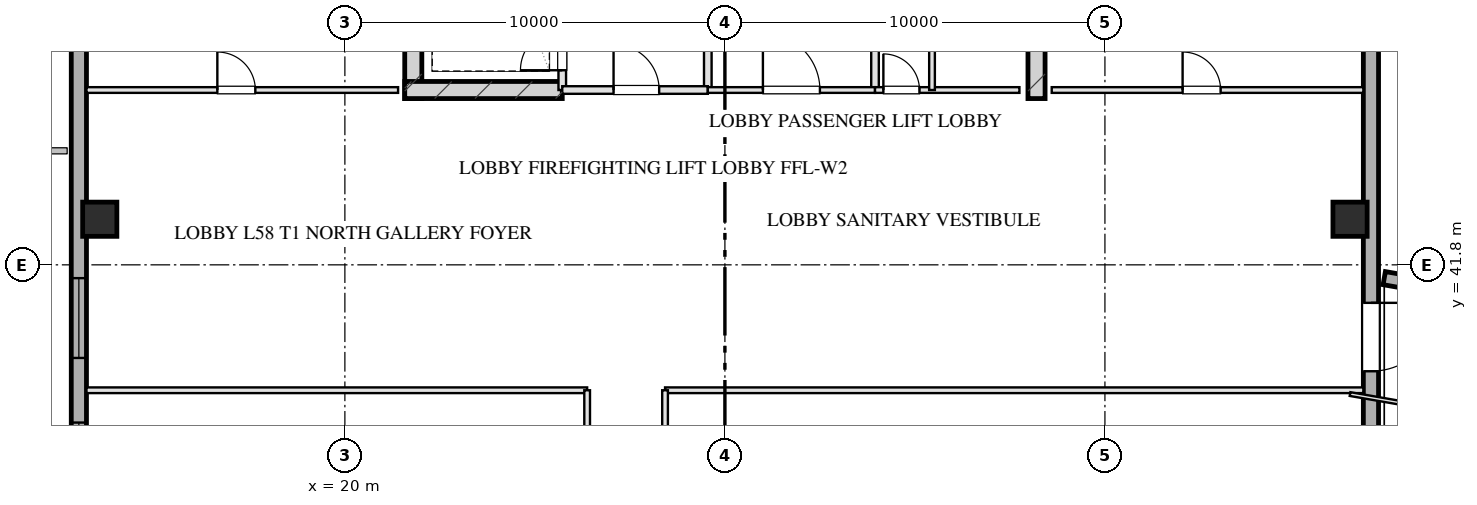
"""IFC4 building model, lengths in metres.
Left out: names, types, materials, properties, quantities, classifications, styles, units other than length and angle.
Written with IfcOpenShell. Run it as: python <this file> out.ifc"""

import sys

from ifc_helpers import new_model, si_unit, direction, frame, frame_2d, origin, origin_2d, place, context, subcontext, project, spatial, rectangle, hollow_rectangle, extrude, element, fill, save


model = new_model("IFC4")
c1 = context("Model", 3, precision=1e-05, world=origin(), true_north=direction((0.0, 1.0)))
c2 = subcontext(c1, "Body", "Model", "MODEL_VIEW")
j1 = project(units=[si_unit("LENGTHUNIT", "METRE"), si_unit("PLANEANGLEUNIT", "RADIAN")], contexts=[c1])
p1 = place(None, origin())
s1 = spatial("IfcSite", under=j1, at=p1, CompositionType="ELEMENT")
p2 = place(p1, origin())
s2 = spatial("IfcBuilding", under=s1, at=p2, CompositionType="ELEMENT")
p3 = place(p2, frame((0.0, 0.0, 216.2)))
s3 = spatial("IfcBuildingStorey", under=s2, at=p3, CompositionType="ELEMENT", Elevation=216.2)
for number, where, z_axis, x_axis in (
    (1, (21.8, 46.175, 0.0), (0.0, 0.0, 1.0), (0.0, 1.0, 0.0)),
    (2, (38.2, 46.175, 0.0), (0.0, 0.0, 1.0), (0.0, 1.0, 0.0)),
):
    element("IfcWall", number, at=place(p3, frame(where, z_axis=z_axis, x_axis=x_axis)), inside=s3, PredefinedType="SHEAR", context=c2, shape_type="SweptSolid", body=[
        extrude(rectangle(XDim=9.33, YDim=0.45, at=frame_2d((4.665, 0.0))), origin(), (0.0, 0.0, 1.0), 3.45),
    ])
p4 = place(p3, frame((21.575, 46.4, 0.0), z_axis=(0.0, 0.0, 1.0), x_axis=(1.0, 0.0, 0.0)))
e3 = element("IfcWall", 3, at=p4, inside=s3, PredefinedType="SHEAR", context=c2, shape_type="SweptSolid", body=[
    extrude(rectangle(XDim=4.145, YDim=0.45, at=frame_2d((2.073, 0.0))), origin(), (0.0, 0.0, 1.0), 3.45),
])
for number, where, z_axis, x_axis in (
    (4, (13.55, 43.0, 0.0), (0.0, 0.0, 1.0), (1.0, 0.0, 0.0)),
    (5, (46.45, 43.0, 0.0), (0.0, 0.0, 1.0), (1.0, 0.0, 0.0)),
):
    element("IfcColumn", number, at=place(p3, frame(where, z_axis=z_axis, x_axis=x_axis)), inside=s3, PredefinedType="COLUMN", context=c2, shape_type="SweptSolid", body=[
        extrude(hollow_rectangle(XDim=0.9, YDim=0.9, WallThickness=0.032, at=origin_2d()), origin(), (0.0, 0.0, 1.0), 3.451),
    ])
p5 = place(p3, frame((13.0, 10.8, 0.0), z_axis=(0.0, 0.0, 1.0), x_axis=(0.0, 1.0, 0.0)))
e6 = element("IfcWall", 6, at=p5, inside=s3, PredefinedType="SOLIDWALL", context=c2, shape_type="SweptSolid", body=[
    extrude(rectangle(XDim=46.4, YDim=0.4, at=frame_2d((23.2, 0.0))), origin(), (0.0, 0.0, 1.0), 2.55),
])
p6 = place(p5, frame((15.75, 0.0, 0.75)))
e7 = element("IfcOpeningElement", 7, at=p6, cuts=e6, PredefinedType="OPENING", context=c2, shape_type="SweptSolid", body=[
    extrude(rectangle(XDim=2.1, YDim=1.4, at=frame_2d((1.05, 0.7))), frame((0.0, 0.21, 0.0), z_axis=(0.0, -1.0, 0.0), x_axis=(1.0, 0.0, 0.0)), (0.0, 0.0, 1.0), 0.42),
])
p7 = place(p5, frame((19.55, 0.0, 0.75)))
e8 = element("IfcOpeningElement", 8, at=p7, cuts=e6, PredefinedType="OPENING", context=c2, shape_type="SweptSolid", body=[
    extrude(rectangle(XDim=2.1, YDim=1.4, at=frame_2d((1.05, 0.7))), frame((0.0, 0.21, 0.0), z_axis=(0.0, -1.0, 0.0), x_axis=(1.0, 0.0, 0.0)), (0.0, 0.0, 1.0), 0.42),
])
p8 = place(p5, frame((24.75, 0.0, 0.75)))
e9 = element("IfcOpeningElement", 9, at=p8, cuts=e6, PredefinedType="OPENING", context=c2, shape_type="SweptSolid", body=[
    extrude(rectangle(XDim=2.1, YDim=1.4, at=frame_2d((1.05, 0.7))), frame((0.0, 0.21, 0.0), z_axis=(0.0, -1.0, 0.0), x_axis=(1.0, 0.0, 0.0)), (0.0, 0.0, 1.0), 0.42),
])
p9 = place(p5, frame((28.55, 0.0, 0.75)))
e10 = element("IfcOpeningElement", 10, at=p9, cuts=e6, PredefinedType="OPENING", context=c2, shape_type="SweptSolid", body=[
    extrude(rectangle(XDim=2.1, YDim=1.4, at=frame_2d((1.05, 0.7))), frame((0.0, 0.21, 0.0), z_axis=(0.0, -1.0, 0.0), x_axis=(1.0, 0.0, 0.0)), (0.0, 0.0, 1.0), 0.42),
])
p10 = place(p3, frame((47.0, 57.2, 0.0), z_axis=(0.0, 0.0, 1.0), x_axis=(0.0, -1.0, 0.0)))
e11 = element("IfcWall", 11, at=p10, inside=s3, PredefinedType="SOLIDWALL", context=c2, shape_type="SweptSolid", body=[
    extrude(rectangle(XDim=46.4, YDim=0.4, at=frame_2d((23.2, 0.0))), origin(), (0.0, 0.0, 1.0), 2.55),
])
p11 = place(p10, frame((16.4, 0.0, 0.0)))
e12 = element("IfcOpeningElement", 12, at=p11, cuts=e11, PredefinedType="OPENING", context=c2, shape_type="SweptSolid", body=[
    extrude(rectangle(XDim=1.8, YDim=2.2, at=frame_2d((0.9, 1.1))), frame((0.0, 0.21, 0.0), z_axis=(0.0, -1.0, 0.0), x_axis=(1.0, 0.0, 0.0)), (0.0, 0.0, 1.0), 0.42),
])
p12 = place(p3, frame((74.177, 36.745, 0.0), z_axis=(0.0, 0.0, 1.0), x_axis=(-0.984966283934, 0.172746691759, 0.0)))
e13 = element("IfcWall", 13, at=p12, inside=s3, PredefinedType="SOLIDWALL", context=c2, shape_type="SweptSolid", body=[
    extrude(rectangle(XDim=27.237, YDim=0.35, at=frame_2d((13.618, 0.0))), origin(), (0.0, 0.0, 1.0), 3.15),
])
p13 = place(p3, frame((25.72, 46.4, 0.0), z_axis=(0.0, 0.0, 1.0), x_axis=(0.0, 1.0, 0.0)))
e14 = element("IfcWall", 14, at=p13, inside=s3, PredefinedType="PARTITIONING", context=c2, shape_type="SweptSolid", body=[
    extrude(rectangle(XDim=1.9, YDim=0.2, at=frame_2d((0.95, 0.0))), origin(), (0.0, 0.0, 1.0), 3.155),
])
p14 = place(p13, frame((0.52, 0.0, 0.0)))
e15 = element("IfcOpeningElement", 15, at=p14, cuts=e14, PredefinedType="OPENING", context=c2, shape_type="SweptSolid", body=[
    extrude(rectangle(XDim=1.1, YDim=2.05, at=frame_2d((0.55, 1.025))), frame((0.0, 0.11, 0.0), z_axis=(0.0, -1.0, 0.0), x_axis=(1.0, 0.0, 0.0)), (0.0, 0.0, 1.0), 0.22),
])
p15 = place(p3, frame((29.55, 46.4, 0.0), z_axis=(0.0, 0.0, 1.0), x_axis=(0.0, 1.0, 0.0)))
e16 = element("IfcWall", 16, at=p15, inside=s3, PredefinedType="PARTITIONING", context=c2, shape_type="SweptSolid", body=[
    extrude(rectangle(XDim=8.43, YDim=0.2, at=frame_2d((4.215, 0.0))), origin(), (0.0, 0.0, 1.0), 3.155),
])
p16 = place(p15, frame((5.95, 0.0, 0.0)))
e17 = element("IfcOpeningElement", 17, at=p16, cuts=e16, PredefinedType="OPENING", context=c2, shape_type="SweptSolid", body=[
    extrude(rectangle(XDim=0.9, YDim=2.05, at=frame_2d((0.45, 1.025))), frame((0.0, 0.11, 0.0), z_axis=(0.0, -1.0, 0.0), x_axis=(1.0, 0.0, 0.0)), (0.0, 0.0, 1.0), 0.22),
])
p17 = place(p3, frame((25.72, 46.4, 0.0), z_axis=(0.0, 0.0, 1.0), x_axis=(1.0, 0.0, 0.0)))
e18 = element("IfcWall", 18, at=p17, inside=s3, PredefinedType="PARTITIONING", context=c2, shape_type="SweptSolid", body=[
    extrude(rectangle(XDim=3.83, YDim=0.2, at=frame_2d((1.915, 0.0))), origin(), (0.0, 0.0, 1.0), 3.155),
])
p18 = place(p17, frame((1.35, 0.0, 0.0)))
e19 = element("IfcOpeningElement", 19, at=p18, cuts=e18, PredefinedType="OPENING", context=c2, shape_type="SweptSolid", body=[
    extrude(rectangle(XDim=1.2, YDim=2.05, at=frame_2d((0.6, 1.025))), frame((0.0, 0.11, 0.0), z_axis=(0.0, -1.0, 0.0), x_axis=(1.0, 0.0, 0.0)), (0.0, 0.0, 1.0), 0.22),
])
p19 = place(p3, frame((33.95, 46.4, 0.0), z_axis=(0.0, 0.0, 1.0), x_axis=(0.0, 1.0, 0.0)))
e20 = element("IfcWall", 20, at=p19, inside=s3, PredefinedType="PARTITIONING", context=c2, shape_type="SweptSolid", body=[
    extrude(rectangle(XDim=8.43, YDim=0.2, at=frame_2d((4.215, 0.0))), origin(), (0.0, 0.0, 1.0), 3.155),
])
p20 = place(p3, frame((29.55, 46.4, 0.0), z_axis=(0.0, 0.0, 1.0), x_axis=(1.0, 0.0, 0.0)))
e21 = element("IfcWall", 21, at=p20, inside=s3, PredefinedType="PARTITIONING", context=c2, shape_type="SweptSolid", body=[
    extrude(rectangle(XDim=4.4, YDim=0.15, at=frame_2d((2.2, 0.0))), origin(), (0.0, 0.0, 1.0), 3.155),
])
p21 = place(p20, frame((1.45, 0.0, 0.0)))
e22 = element("IfcOpeningElement", 22, at=p21, cuts=e21, PredefinedType="OPENING", context=c2, shape_type="SweptSolid", body=[
    extrude(rectangle(XDim=1.5, YDim=2.05, at=frame_2d((0.75, 1.025))), frame((0.0, 0.085, 0.0), z_axis=(0.0, -1.0, 0.0), x_axis=(1.0, 0.0, 0.0)), (0.0, 0.0, 1.0), 0.17),
])
p22 = place(p3, frame((33.95, 46.4, 0.0), z_axis=(0.0, 0.0, 1.0), x_axis=(1.0, 0.0, 0.0)))
e23 = element("IfcWall", 23, at=p22, inside=s3, PredefinedType="PARTITIONING", context=c2, shape_type="SweptSolid", body=[
    extrude(rectangle(XDim=3.8, YDim=0.15, at=frame_2d((1.9, 0.0))), origin(), (0.0, 0.0, 1.0), 3.155),
])
p23 = place(p22, frame((0.22, 0.0, 0.0)))
e24 = element("IfcOpeningElement", 24, at=p23, cuts=e23, PredefinedType="OPENING", context=c2, shape_type="SweptSolid", body=[
    extrude(rectangle(XDim=0.95, YDim=2.05, at=frame_2d((0.475, 1.025))), frame((0.0, 0.085, 0.0), z_axis=(0.0, -1.0, 0.0), x_axis=(1.0, 0.0, 0.0)), (0.0, 0.0, 1.0), 0.17),
])
p24 = place(p3, frame((35.45, 46.4, 0.0), z_axis=(0.0, 0.0, 1.0), x_axis=(0.0, 1.0, 0.0)))
e25 = element("IfcWall", 25, at=p24, inside=s3, PredefinedType="PARTITIONING", context=c2, shape_type="SweptSolid", body=[
    extrude(rectangle(XDim=8.43, YDim=0.15, at=frame_2d((4.215, 0.0))), origin(), (0.0, 0.0, 1.0), 2.745),
])
p25 = place(p24, frame((2.55, 0.0, 0.0)))
e26 = element("IfcOpeningElement", 26, at=p25, cuts=e25, PredefinedType="OPENING", context=c2, shape_type="SweptSolid", body=[
    extrude(rectangle(XDim=0.95, YDim=2.05, at=frame_2d((0.475, 1.025))), frame((0.0, 0.085, 0.0), z_axis=(0.0, -1.0, 0.0), x_axis=(1.0, 0.0, 0.0)), (0.0, 0.0, 1.0), 0.17),
])
p26 = place(p24, frame((4.7, 0.0, 0.0)))
e27 = element("IfcOpeningElement", 27, at=p26, cuts=e25, PredefinedType="OPENING", context=c2, shape_type="SweptSolid", body=[
    extrude(rectangle(XDim=0.9, YDim=2.05, at=frame_2d((0.45, 1.025))), frame((0.0, 0.085, 0.0), z_axis=(0.0, -1.0, 0.0), x_axis=(1.0, 0.0, 0.0)), (0.0, 0.0, 1.0), 0.17),
])
p27 = place(p24, frame((6.8, 0.0, 0.0)))
e28 = element("IfcOpeningElement", 28, at=p27, cuts=e25, PredefinedType="OPENING", context=c2, shape_type="SweptSolid", body=[
    extrude(rectangle(XDim=0.9, YDim=2.05, at=frame_2d((0.45, 1.025))), frame((0.0, 0.085, 0.0), z_axis=(0.0, -1.0, 0.0), x_axis=(1.0, 0.0, 0.0)), (0.0, 0.0, 1.0), 0.17),
])
p28 = place(p3, frame((13.2, 46.4, 0.0), z_axis=(0.0, 0.0, 1.0), x_axis=(1.0, 0.0, 0.0)))
e29 = element("IfcWall", 29, at=p28, inside=s3, PredefinedType="PARTITIONING", context=c2, shape_type="SweptSolid", body=[
    extrude(rectangle(XDim=8.2, YDim=0.15, at=frame_2d((4.1, 0.0))), origin(), (0.0, 0.0, 1.0), 3.155),
])
p29 = place(p28, frame((3.444, 0.0, 0.0)))
e30 = element("IfcOpeningElement", 30, at=p29, cuts=e29, PredefinedType="OPENING", context=c2, shape_type="SweptSolid", body=[
    extrude(rectangle(XDim=1.0, YDim=2.05, at=frame_2d((0.5, 1.025))), frame((0.0, 0.085, 0.0), z_axis=(0.0, -1.0, 0.0), x_axis=(1.0, 0.0, 0.0)), (0.0, 0.0, 1.0), 0.17),
])
p30 = place(p3, frame((38.6, 46.4, 0.0), z_axis=(0.0, 0.0, 1.0), x_axis=(1.0, 0.0, 0.0)))
e31 = element("IfcWall", 31, at=p30, inside=s3, PredefinedType="PARTITIONING", context=c2, shape_type="SweptSolid", body=[
    extrude(rectangle(XDim=8.2, YDim=0.15, at=frame_2d((4.1, 0.0))), origin(), (0.0, 0.0, 1.0), 3.155),
])
p31 = place(p30, frame((3.444, 0.0, 0.0)))
e32 = element("IfcOpeningElement", 32, at=p31, cuts=e31, PredefinedType="OPENING", context=c2, shape_type="SweptSolid", body=[
    extrude(rectangle(XDim=1.0, YDim=2.05, at=frame_2d((0.5, 1.025))), frame((0.0, 0.085, 0.0), z_axis=(0.0, -1.0, 0.0), x_axis=(1.0, 0.0, 0.0)), (0.0, 0.0, 1.0), 0.17),
])
p32 = place(p3, frame((13.2, 38.5, 0.0), z_axis=(0.0, 0.0, 1.0), x_axis=(1.0, 0.0, 0.0)))
e33 = element("IfcWall", 33, at=p32, inside=s3, PredefinedType="PARTITIONING", context=c2, shape_type="SweptSolid", body=[
    extrude(rectangle(XDim=13.175, YDim=0.15, at=frame_2d((6.587, 0.0))), origin(), (0.0, 0.0, 1.0), 3.155),
])
p33 = place(p3, frame((28.425, 38.5, 0.0), z_axis=(0.0, 0.0, 1.0), x_axis=(1.0, 0.0, 0.0)))
e34 = element("IfcWall", 34, at=p33, inside=s3, PredefinedType="PARTITIONING", context=c2, shape_type="SweptSolid", body=[
    extrude(rectangle(XDim=18.375, YDim=0.15, at=frame_2d((9.188, 0.0))), origin(), (0.0, 0.0, 1.0), 3.155),
])
p34 = place(p3, frame((26.375, 29.5, 0.0), z_axis=(0.0, 0.0, 1.0), x_axis=(0.0, 1.0, 0.0)))
e35 = element("IfcWall", 35, at=p34, inside=s3, PredefinedType="PARTITIONING", context=c2, shape_type="SweptSolid", body=[
    extrude(rectangle(XDim=9.0, YDim=0.15, at=frame_2d((4.5, 0.0))), origin(), (0.0, 0.0, 1.0), 3.155),
])
p35 = place(p34, frame((1.16, 0.0, 0.0)))
e36 = element("IfcOpeningElement", 36, at=p35, cuts=e35, PredefinedType="OPENING", context=c2, shape_type="SweptSolid", body=[
    extrude(rectangle(XDim=0.85, YDim=2.05, at=frame_2d((0.425, 1.025))), frame((0.0, 0.085, 0.0), z_axis=(0.0, -1.0, 0.0), x_axis=(1.0, 0.0, 0.0)), (0.0, 0.0, 1.0), 0.17),
])
p36 = place(p34, frame((5.66, 0.0, 0.0)))
e37 = element("IfcOpeningElement", 37, at=p36, cuts=e35, PredefinedType="OPENING", context=c2, shape_type="SweptSolid", body=[
    extrude(rectangle(XDim=1.05, YDim=2.05, at=frame_2d((0.525, 1.025))), frame((0.0, 0.085, 0.0), z_axis=(0.0, -1.0, 0.0), x_axis=(1.0, 0.0, 0.0)), (0.0, 0.0, 1.0), 0.17),
])
p37 = place(p3, frame((28.425, 29.5, 0.0), z_axis=(0.0, 0.0, 1.0), x_axis=(0.0, 1.0, 0.0)))
e38 = element("IfcWall", 38, at=p37, inside=s3, PredefinedType="PARTITIONING", context=c2, shape_type="SweptSolid", body=[
    extrude(rectangle(XDim=9.0, YDim=0.15, at=frame_2d((4.5, 0.0))), origin(), (0.0, 0.0, 1.0), 3.155),
])
p38 = place(p37, frame((1.16, 0.0, 0.0)))
e39 = element("IfcOpeningElement", 39, at=p38, cuts=e38, PredefinedType="OPENING", context=c2, shape_type="SweptSolid", body=[
    extrude(rectangle(XDim=1.0, YDim=2.05, at=frame_2d((0.5, 1.025))), frame((0.0, 0.085, 0.0), z_axis=(0.0, -1.0, 0.0), x_axis=(1.0, 0.0, 0.0)), (0.0, 0.0, 1.0), 0.17),
])
p39 = place(p37, frame((5.66, 0.0, 0.0)))
e40 = element("IfcOpeningElement", 40, at=p39, cuts=e38, PredefinedType="OPENING", context=c2, shape_type="SweptSolid", body=[
    extrude(rectangle(XDim=1.0, YDim=2.05, at=frame_2d((0.5, 1.025))), frame((0.0, 0.085, 0.0), z_axis=(0.0, -1.0, 0.0), x_axis=(1.0, 0.0, 0.0)), (0.0, 0.0, 1.0), 0.17),
])
p40 = place(p3, frame((46.45, 38.4, 0.0), z_axis=(0.0, 0.0, 1.0), x_axis=(0.985202712742, -0.171393158571, 0.0)))
e41 = element("IfcWall", 41, at=p40, inside=s3, PredefinedType="MOVABLE", context=c2, shape_type="SweptSolid", body=[
    extrude(rectangle(XDim=28.144, YDim=0.1, at=frame_2d((14.072, 0.0))), origin(), (0.0, 0.0, 1.0), 3.155),
])
p41 = place(p40, frame((6.2, 0.0, 0.0)))
e42 = element("IfcOpeningElement", 42, at=p41, cuts=e41, PredefinedType="OPENING", context=c2, shape_type="SweptSolid", body=[
    extrude(rectangle(XDim=1.2, YDim=2.05, at=frame_2d((0.6, 1.025))), frame((0.0, 0.06, 0.0), z_axis=(0.0, -1.0, 0.0), x_axis=(1.0, 0.0, 0.0)), (0.0, 0.0, 1.0), 0.12),
])
p42 = place(p40, frame((18.5, 0.0, 0.0)))
e43 = element("IfcOpeningElement", 43, at=p42, cuts=e41, PredefinedType="OPENING", context=c2, shape_type="SweptSolid", body=[
    extrude(rectangle(XDim=1.2, YDim=2.05, at=frame_2d((0.6, 1.025))), frame((0.0, 0.06, 0.0), z_axis=(0.0, -1.0, 0.0), x_axis=(1.0, 0.0, 0.0)), (0.0, 0.0, 1.0), 0.12),
])
p43 = place(p8, origin())
e44 = element("IfcWindow", 44, at=p43, inside=s3, PartitioningType="TRIPLE_PANEL_VERTICAL", PredefinedType="WINDOW", context=c2, shape_type="SweptSolid", body=[
    extrude(rectangle(XDim=2.1, YDim=1.4, at=frame_2d((1.05, 0.7))), frame((0.0, 0.03, 0.0), z_axis=(0.0, -1.0, 0.0), x_axis=(1.0, 0.0, 0.0)), (0.0, 0.0, 1.0), 0.06),
])
fill(e9, e44)
p44 = place(p9, origin())
e45 = element("IfcWindow", 45, at=p44, inside=s3, PartitioningType="TRIPLE_PANEL_VERTICAL", PredefinedType="WINDOW", context=c2, shape_type="SweptSolid", body=[
    extrude(rectangle(XDim=2.1, YDim=1.4, at=frame_2d((1.05, 0.7))), frame((0.0, 0.03, 0.0), z_axis=(0.0, -1.0, 0.0), x_axis=(1.0, 0.0, 0.0)), (0.0, 0.0, 1.0), 0.06),
])
fill(e10, e45)
p45 = place(p11, origin())
e46 = element("IfcDoor", 46, at=p45, inside=s3, OperationType="SINGLE_SWING_LEFT", PredefinedType="DOOR", context=c2, shape_type="SweptSolid", body=[
    extrude(rectangle(XDim=1.8, YDim=2.2, at=frame_2d((0.9, 1.1))), frame((0.0, 0.025, 0.0), z_axis=(0.0, -1.0, 0.0), x_axis=(1.0, 0.0, 0.0)), (0.0, 0.0, 1.0), 0.05),
])
fill(e12, e46)
p46 = place(p14, origin())
e47 = element("IfcDoor", 47, at=p46, inside=s3, OperationType="SINGLE_SWING_LEFT", PredefinedType="DOOR", context=c2, shape_type="SweptSolid", body=[
    extrude(rectangle(XDim=1.1, YDim=2.05, at=frame_2d((0.55, 1.025))), frame((0.0, 0.025, 0.0), z_axis=(0.0, -1.0, 0.0), x_axis=(1.0, 0.0, 0.0)), (0.0, 0.0, 1.0), 0.05),
])
fill(e15, e47)
p47 = place(p18, origin())
e48 = element("IfcDoor", 48, at=p47, inside=s3, OperationType="SINGLE_SWING_LEFT", PredefinedType="DOOR", context=c2, shape_type="SweptSolid", body=[
    extrude(rectangle(XDim=1.2, YDim=2.05, at=frame_2d((0.6, 1.025))), frame((0.0, 0.025, 0.0), z_axis=(0.0, -1.0, 0.0), x_axis=(1.0, 0.0, 0.0)), (0.0, 0.0, 1.0), 0.05),
])
fill(e19, e48)
p48 = place(p21, origin())
e49 = element("IfcDoor", 49, at=p48, inside=s3, OperationType="SINGLE_SWING_LEFT", PredefinedType="DOOR", context=c2, shape_type="SweptSolid", body=[
    extrude(rectangle(XDim=1.5, YDim=2.05, at=frame_2d((0.75, 1.025))), frame((0.0, 0.025, 0.0), z_axis=(0.0, -1.0, 0.0), x_axis=(1.0, 0.0, 0.0)), (0.0, 0.0, 1.0), 0.05),
])
fill(e22, e49)
p49 = place(p23, origin())
e50 = element("IfcDoor", 50, at=p49, inside=s3, OperationType="SINGLE_SWING_LEFT", PredefinedType="DOOR", context=c2, shape_type="SweptSolid", body=[
    extrude(rectangle(XDim=0.95, YDim=2.05, at=frame_2d((0.475, 1.025))), frame((0.0, 0.025, 0.0), z_axis=(0.0, -1.0, 0.0), x_axis=(1.0, 0.0, 0.0)), (0.0, 0.0, 1.0), 0.05),
])
fill(e24, e50)
p50 = place(p29, origin())
e51 = element("IfcDoor", 51, at=p50, inside=s3, OperationType="SINGLE_SWING_LEFT", PredefinedType="DOOR", context=c2, shape_type="SweptSolid", body=[
    extrude(rectangle(XDim=1.0, YDim=2.05, at=frame_2d((0.5, 1.025))), frame((0.0, 0.025, 0.0), z_axis=(0.0, -1.0, 0.0), x_axis=(1.0, 0.0, 0.0)), (0.0, 0.0, 1.0), 0.05),
])
fill(e30, e51)
p51 = place(p31, origin())
e52 = element("IfcDoor", 52, at=p51, inside=s3, OperationType="SINGLE_SWING_LEFT", PredefinedType="DOOR", context=c2, shape_type="SweptSolid", body=[
    extrude(rectangle(XDim=1.0, YDim=2.05, at=frame_2d((0.5, 1.025))), frame((0.0, 0.025, 0.0), z_axis=(0.0, -1.0, 0.0), x_axis=(1.0, 0.0, 0.0)), (0.0, 0.0, 1.0), 0.05),
])
fill(e32, e52)
save(model, sys.argv[1])
